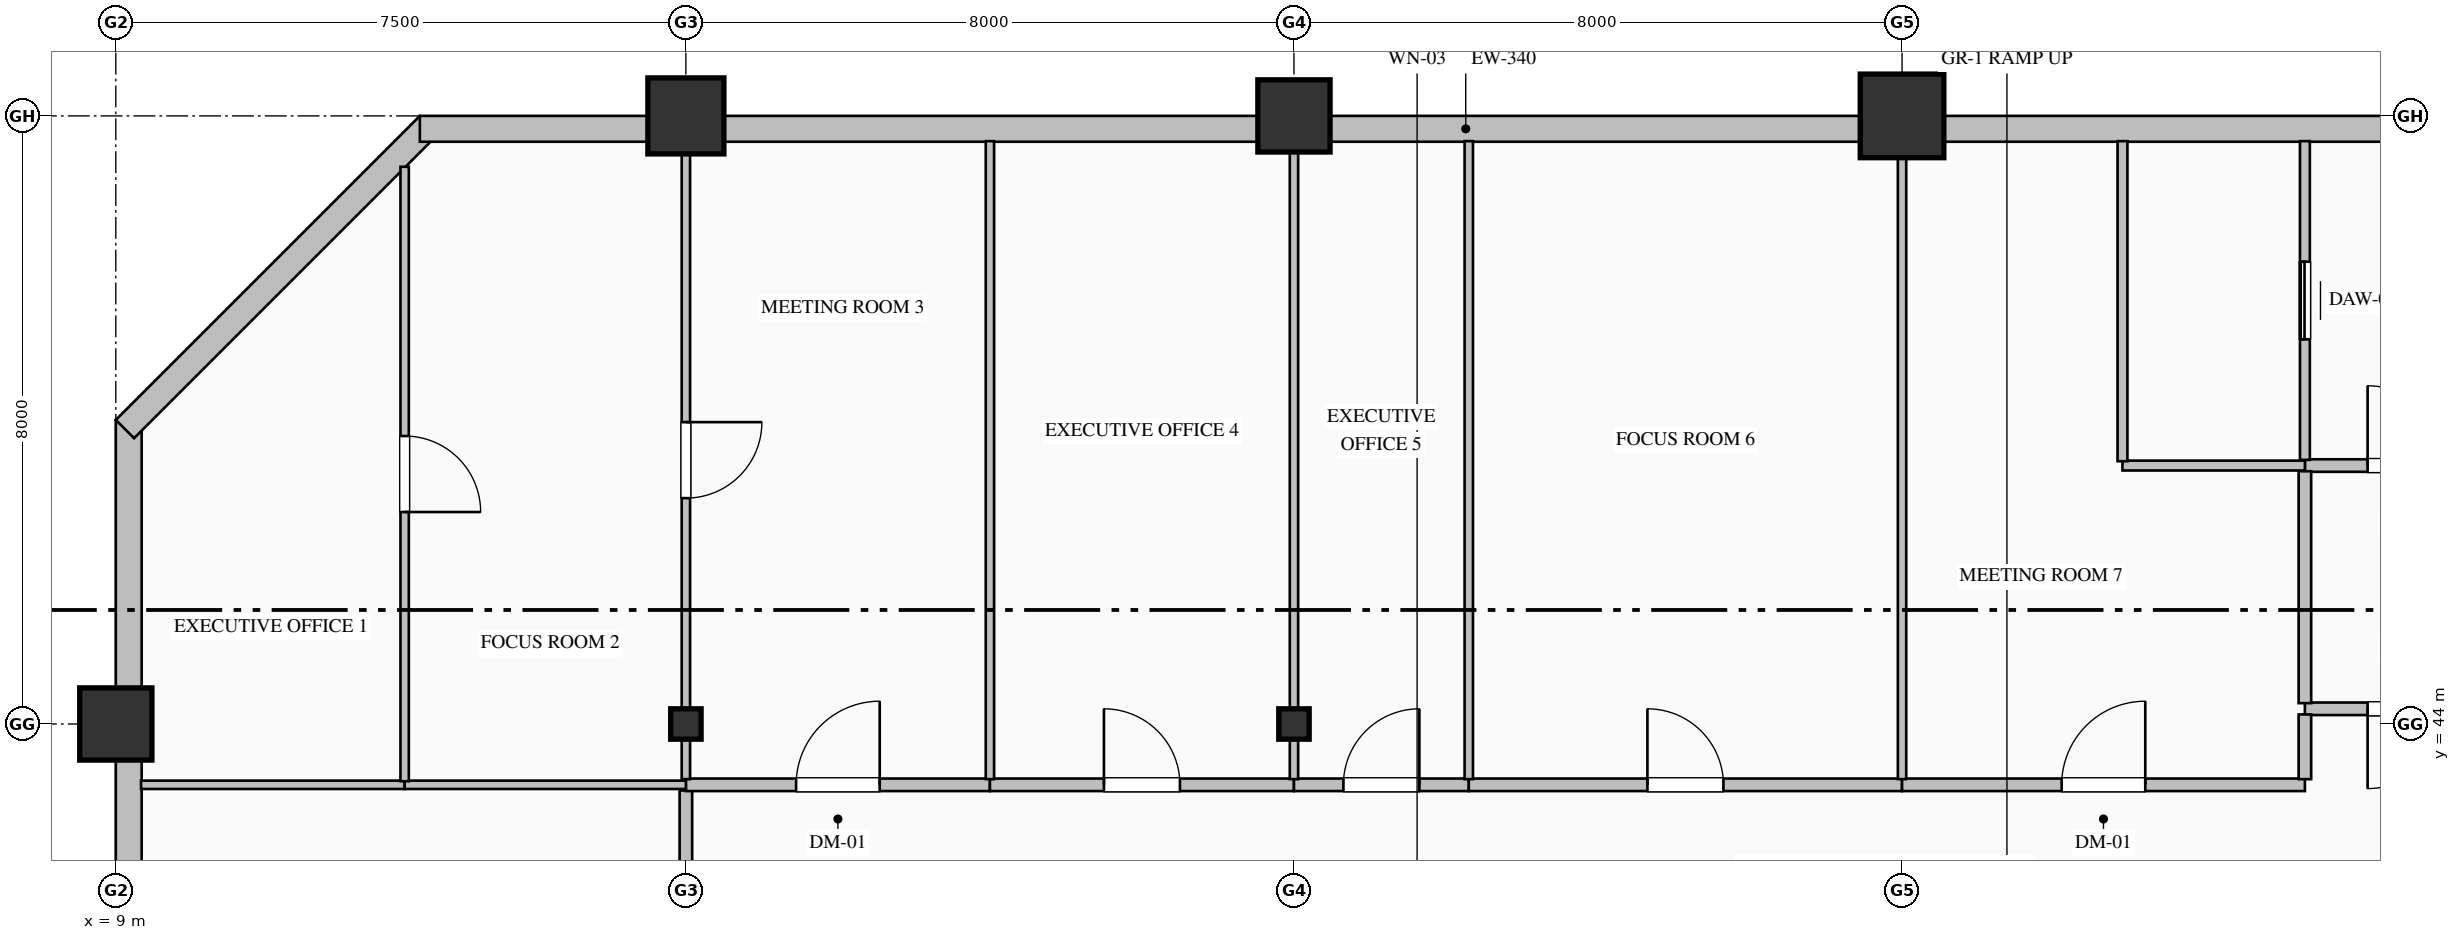
"""IFC4 building model, lengths in metres.
Left out: names, types, materials, properties, quantities, classifications, styles, units other than length and angle.
Written with IfcOpenShell. Run it as: python <this file> out.ifc"""

import sys

from ifc_helpers import new_model, si_unit, direction, frame, frame_2d, origin, origin_2d, place, context, subcontext, project, spatial, rectangle, hollow_rectangle, hollow_circle, i_section, extrude, element, fill, save


model = new_model("IFC4")
c1 = context("Model", 3, precision=1e-05, world=origin(), true_north=direction((0.0, 1.0)))
c2 = subcontext(c1, "Body", "Model", "MODEL_VIEW")
j1 = project(units=[si_unit("LENGTHUNIT", "METRE"), si_unit("PLANEANGLEUNIT", "RADIAN")], contexts=[c1])
p1 = place(None, origin())
s1 = spatial("IfcSite", under=j1, at=p1, CompositionType="ELEMENT")
p2 = place(p1, origin())
s2 = spatial("IfcBuilding", under=s1, at=p2, CompositionType="ELEMENT")
p3 = place(p2, frame((0.0, 0.0, 123.0)))
s3 = spatial("IfcBuildingStorey", under=s2, at=p3, CompositionType="ELEMENT", Elevation=123.0)
p4 = place(p3, frame((9.0, 44.0, 0.0), z_axis=(0.0, 0.0, 1.0), x_axis=(1.0, 0.0, 0.0)))
e1 = element("IfcColumn", 1, at=p4, inside=s3, PredefinedType="COLUMN", context=c2, shape_type="SweptSolid", body=[
    extrude(hollow_rectangle(XDim=0.95, YDim=0.95, WallThickness=0.036, at=origin_2d()), origin(), (0.0, 0.0, 1.0), 4.0),
])
p5 = place(p3, frame((16.5, 44.0, 0.0), z_axis=(0.0, 0.0, 1.0), x_axis=(1.0, 0.0, 0.0)))
e2 = element("IfcColumn", 2, at=p5, inside=s3, PredefinedType="COLUMN", context=c2, shape_type="SweptSolid", body=[
    extrude(i_section(OverallWidth=0.4, OverallDepth=0.4, WebThickness=0.013, FlangeThickness=0.021, FilletRadius=0.022, at=origin_2d()), origin(), (0.0, 0.0, 1.0), 4.0),
])
p6 = place(p3, frame((16.5, 52.0, 0.0), z_axis=(0.0, 0.0, 1.0), x_axis=(1.0, 0.0, 0.0)))
e3 = element("IfcColumn", 3, at=p6, inside=s3, PredefinedType="COLUMN", context=c2, shape_type="SweptSolid", body=[
    extrude(hollow_circle(Radius=0.5, WallThickness=0.036, at=origin_2d()), origin(), (0.0, 0.0, 1.0), 4.0),
])
p7 = place(p3, frame((24.5, 44.0, 0.0), z_axis=(0.0, 0.0, 1.0), x_axis=(1.0, 0.0, 0.0)))
e4 = element("IfcColumn", 4, at=p7, inside=s3, PredefinedType="COLUMN", context=c2, shape_type="SweptSolid", body=[
    extrude(i_section(OverallWidth=0.4, OverallDepth=0.4, WebThickness=0.013, FlangeThickness=0.021, FilletRadius=0.022, at=origin_2d()), origin(), (0.0, 0.0, 1.0), 4.0),
])
p8 = place(p3, frame((24.5, 52.0, 0.0), z_axis=(0.0, 0.0, 1.0), x_axis=(1.0, 0.0, 0.0)))
e5 = element("IfcColumn", 5, at=p8, inside=s3, PredefinedType="COLUMN", context=c2, shape_type="SweptSolid", body=[
    extrude(hollow_rectangle(XDim=0.95, YDim=0.95, WallThickness=0.036, at=origin_2d()), origin(), (0.0, 0.0, 1.0), 4.0),
])
p9 = place(p3, frame((32.5, 52.0, 0.0), z_axis=(0.0, 0.0, 1.0), x_axis=(1.0, 0.0, 0.0)))
e6 = element("IfcColumn", 6, at=p9, inside=s3, PredefinedType="COLUMN", context=c2, shape_type="SweptSolid", body=[
    extrude(hollow_rectangle(XDim=1.1, YDim=1.1, WallThickness=0.04, at=origin_2d()), origin(), (0.0, 0.0, 1.0), 4.0),
])
p10 = place(p3, frame((9.17, 32.0, 0.0), z_axis=(0.0, 0.0, 1.0), x_axis=(0.0, 1.0, 0.0)))
e7 = element("IfcWall", 7, at=p10, inside=s3, PredefinedType="SOLIDWALL", context=c2, shape_type="SweptSolid", body=[
    extrude(rectangle(XDim=16.0, YDim=0.34, at=frame_2d((8.0, 0.0))), origin(), (0.0, 0.0, 1.0), 3.265),
])
p11 = place(p10, frame((6.45, 0.0, 0.85)))
e8 = element("IfcOpeningElement", 8, at=p11, cuts=e7, PredefinedType="OPENING", context=c2, shape_type="SweptSolid", body=[
    extrude(rectangle(XDim=1.5, YDim=1.95, at=frame_2d((0.75, 0.975))), frame((0.0, 0.18, 0.0), z_axis=(0.0, -1.0, 0.0), x_axis=(1.0, 0.0, 0.0)), (0.0, 0.0, 1.0), 0.36),
])
p12 = place(p3, frame((9.12, 47.88, 0.0), z_axis=(0.0, 0.0, 1.0), x_axis=(0.707106781187, 0.707106781187, 0.0)))
e9 = element("IfcWall", 9, at=p12, inside=s3, PredefinedType="SOLIDWALL", context=c2, shape_type="SweptSolid", body=[
    extrude(rectangle(XDim=5.657, YDim=0.34, at=frame_2d((2.828, 0.0))), origin(), (0.0, 0.0, 1.0), 3.765),
])
p13 = place(p3, frame((13.0, 51.83, 0.0), z_axis=(0.0, 0.0, 1.0), x_axis=(1.0, 0.0, 0.0)))
e10 = element("IfcWall", 10, at=p13, inside=s3, PredefinedType="SOLIDWALL", context=c2, shape_type="SweptSolid", body=[
    extrude(rectangle(XDim=27.52, YDim=0.34, at=frame_2d((13.76, 0.0))), origin(), (0.0, 0.0, 1.0), 3.265),
])
p14 = place(p3, frame((37.8, 47.4, 0.0), z_axis=(0.0, 0.0, 1.0), x_axis=(1.0, 0.0, 0.0)))
e11 = element("IfcWall", 11, at=p14, inside=s3, PredefinedType="PARTITIONING", context=c2, shape_type="SweptSolid", body=[
    extrude(rectangle(XDim=2.7, YDim=0.165, at=frame_2d((1.35, 0.0))), origin(), (0.0, 0.0, 1.0), 3.765),
])
p15 = place(p14, frame((0.825, 0.0, 0.0)))
e12 = element("IfcOpeningElement", 12, at=p15, cuts=e11, PredefinedType="OPENING", context=c2, shape_type="SweptSolid", body=[
    extrude(rectangle(XDim=1.05, YDim=2.15, at=frame_2d((0.525, 1.075))), frame((0.0, 0.093, 0.0), z_axis=(0.0, -1.0, 0.0), x_axis=(1.0, 0.0, 0.0)), (0.0, 0.0, 1.0), 0.185),
])
p16 = place(p3, frame((40.5, 44.2, 0.0), z_axis=(0.0, 0.0, 1.0), x_axis=(-1.0, 0.0, 0.0)))
e13 = element("IfcWall", 13, at=p16, inside=s3, PredefinedType="PARTITIONING", context=c2, shape_type="SweptSolid", body=[
    extrude(rectangle(XDim=2.7, YDim=0.165, at=frame_2d((1.35, 0.0))), origin(), (0.0, 0.0, 1.0), 3.765),
])
p17 = place(p16, frame((0.825, 0.0, 0.0)))
e14 = element("IfcOpeningElement", 14, at=p17, cuts=e13, PredefinedType="OPENING", context=c2, shape_type="SweptSolid", body=[
    extrude(rectangle(XDim=1.05, YDim=2.15, at=frame_2d((0.525, 1.075))), frame((0.0, 0.093, 0.0), z_axis=(0.0, -1.0, 0.0), x_axis=(1.0, 0.0, 0.0)), (0.0, 0.0, 1.0), 0.185),
])
p18 = place(p3, frame((37.8, 44.274, 0.0), z_axis=(0.0, 0.0, 1.0), x_axis=(0.0, 1.0, 0.0)))
e15 = element("IfcWall", 15, at=p18, inside=s3, PredefinedType="PARTITIONING", context=c2, shape_type="SweptSolid", body=[
    extrude(rectangle(XDim=3.051, YDim=0.165, at=frame_2d((1.525, 0.0))), origin(), (0.0, 0.0, 1.0), 3.765),
])
p19 = place(p3, frame((37.8, 47.475, 0.0), z_axis=(0.0, 0.0, 1.0), x_axis=(0.0, 1.0, 0.0)))
e16 = element("IfcWall", 16, at=p19, inside=s3, PredefinedType="PARTITIONING", context=c2, shape_type="SweptSolid", body=[
    extrude(rectangle(XDim=4.193, YDim=0.13, at=frame_2d((2.097, 0.0))), origin(), (0.0, 0.0, 1.0), 3.765),
])
p20 = place(p19, frame((1.587, 0.0, 0.0)))
e17 = element("IfcOpeningElement", 17, at=p20, cuts=e16, PredefinedType="OPENING", context=c2, shape_type="SweptSolid", body=[
    extrude(rectangle(XDim=1.02, YDim=2.15, at=frame_2d((0.51, 1.075))), frame((0.0, 0.075, 0.0), z_axis=(0.0, -1.0, 0.0), x_axis=(1.0, 0.0, 0.0)), (0.0, 0.0, 1.0), 0.15),
])
p21 = place(p3, frame((37.8, 47.4, 0.0), z_axis=(0.0, 0.0, 1.0), x_axis=(-1.0, 0.0, 0.0)))
e18 = element("IfcWall", 18, at=p21, inside=s3, PredefinedType="PARTITIONING", context=c2, shape_type="SweptSolid", body=[
    extrude(rectangle(XDim=2.4, YDim=0.13, at=frame_2d((1.2, 0.0))), origin(), (0.0, 0.0, 1.0), 3.765),
])
p22 = place(p3, frame((35.4, 47.457, 0.0), z_axis=(0.0, 0.0, 1.0), x_axis=(0.0, 1.0, 0.0)))
e19 = element("IfcWall", 19, at=p22, inside=s3, PredefinedType="PARTITIONING", context=c2, shape_type="SweptSolid", body=[
    extrude(rectangle(XDim=4.211, YDim=0.13, at=frame_2d((2.105, 0.0))), origin(), (0.0, 0.0, 1.0), 3.765),
])
p23 = place(p3, frame((16.5, 41.0, 0.0), z_axis=(0.0, 0.0, 1.0), x_axis=(0.0, 1.0, 0.0)))
e20 = element("IfcWall", 20, at=p23, inside=s3, PredefinedType="PARTITIONING", context=c2, shape_type="SweptSolid", body=[
    extrude(rectangle(XDim=2.125, YDim=0.165, at=frame_2d((1.063, 0.0))), origin(), (0.0, 0.0, 1.0), 3.157),
])
p24 = place(p3, frame((16.5, 43.2, 0.0), z_axis=(0.0, 0.0, 1.0), x_axis=(1.0, 0.0, 0.0)))
e21 = element("IfcWall", 21, at=p24, inside=s3, PredefinedType="PARTITIONING", context=c2, shape_type="SweptSolid", body=[
    extrude(rectangle(XDim=4.0, YDim=0.165, at=frame_2d((2.0, 0.0))), origin(), (0.0, 0.0, 1.0), 3.765),
])
p25 = place(p24, frame((1.45, 0.0, 0.0)))
e22 = element("IfcOpeningElement", 22, at=p25, cuts=e21, PredefinedType="OPENING", context=c2, shape_type="SweptSolid", body=[
    extrude(rectangle(XDim=1.1, YDim=2.2, at=frame_2d((0.55, 1.1))), frame((0.0, 0.093, 0.0), z_axis=(0.0, -1.0, 0.0), x_axis=(1.0, 0.0, 0.0)), (0.0, 0.0, 1.0), 0.185),
])
p26 = place(p3, frame((20.5, 43.2, 0.0), z_axis=(0.0, 0.0, 1.0), x_axis=(1.0, 0.0, 0.0)))
e23 = element("IfcWall", 23, at=p26, inside=s3, PredefinedType="PARTITIONING", context=c2, shape_type="SweptSolid", body=[
    extrude(rectangle(XDim=4.0, YDim=0.165, at=frame_2d((2.0, 0.0))), origin(), (0.0, 0.0, 1.0), 3.765),
])
p27 = place(p26, frame((1.5, 0.0, 0.0)))
e24 = element("IfcOpeningElement", 24, at=p27, cuts=e23, PredefinedType="OPENING", context=c2, shape_type="SweptSolid", body=[
    extrude(rectangle(XDim=1.0, YDim=2.15, at=frame_2d((0.5, 1.075))), frame((0.0, 0.093, 0.0), z_axis=(0.0, -1.0, 0.0), x_axis=(1.0, 0.0, 0.0)), (0.0, 0.0, 1.0), 0.185),
])
p28 = place(p3, frame((24.5, 43.2, 0.0), z_axis=(0.0, 0.0, 1.0), x_axis=(1.0, 0.0, 0.0)))
e25 = element("IfcWall", 25, at=p28, inside=s3, PredefinedType="PARTITIONING", context=c2, shape_type="SweptSolid", body=[
    extrude(rectangle(XDim=2.3, YDim=0.165, at=frame_2d((1.15, 0.0))), origin(), (0.0, 0.0, 1.0), 3.765),
])
p29 = place(p28, frame((0.65, 0.0, 0.0)))
e26 = element("IfcOpeningElement", 26, at=p29, cuts=e25, PredefinedType="OPENING", context=c2, shape_type="SweptSolid", body=[
    extrude(rectangle(XDim=1.0, YDim=2.15, at=frame_2d((0.5, 1.075))), frame((0.0, 0.093, 0.0), z_axis=(0.0, -1.0, 0.0), x_axis=(1.0, 0.0, 0.0)), (0.0, 0.0, 1.0), 0.185),
])
p30 = place(p3, frame((26.8, 43.2, 0.0), z_axis=(0.0, 0.0, 1.0), x_axis=(1.0, 0.0, 0.0)))
e27 = element("IfcWall", 27, at=p30, inside=s3, PredefinedType="PARTITIONING", context=c2, shape_type="SweptSolid", body=[
    extrude(rectangle(XDim=5.7, YDim=0.165, at=frame_2d((2.85, 0.0))), origin(), (0.0, 0.0, 1.0), 3.765),
])
p31 = place(p30, frame((2.35, 0.0, 0.0)))
e28 = element("IfcOpeningElement", 28, at=p31, cuts=e27, PredefinedType="OPENING", context=c2, shape_type="SweptSolid", body=[
    extrude(rectangle(XDim=1.0, YDim=2.15, at=frame_2d((0.5, 1.075))), frame((0.0, 0.093, 0.0), z_axis=(0.0, -1.0, 0.0), x_axis=(1.0, 0.0, 0.0)), (0.0, 0.0, 1.0), 0.185),
])
p32 = place(p3, frame((32.5, 43.2, 0.0), z_axis=(0.0, 0.0, 1.0), x_axis=(1.0, 0.0, 0.0)))
e29 = element("IfcWall", 29, at=p32, inside=s3, PredefinedType="PARTITIONING", context=c2, shape_type="SweptSolid", body=[
    extrude(rectangle(XDim=5.3, YDim=0.165, at=frame_2d((2.65, 0.0))), origin(), (0.0, 0.0, 1.0), 3.765),
])
p33 = place(p32, frame((2.1, 0.0, 0.0)))
e30 = element("IfcOpeningElement", 30, at=p33, cuts=e29, PredefinedType="OPENING", context=c2, shape_type="SweptSolid", body=[
    extrude(rectangle(XDim=1.1, YDim=2.2, at=frame_2d((0.55, 1.1))), frame((0.0, 0.093, 0.0), z_axis=(0.0, -1.0, 0.0), x_axis=(1.0, 0.0, 0.0)), (0.0, 0.0, 1.0), 0.185),
])
p34 = place(p3, frame((37.8, 43.274, 0.0), z_axis=(0.0, 0.0, 1.0), x_axis=(0.0, 1.0, 0.0)))
e31 = element("IfcWall", 31, at=p34, inside=s3, PredefinedType="PARTITIONING", context=c2, shape_type="SweptSolid", body=[
    extrude(rectangle(XDim=0.851, YDim=0.165, at=frame_2d((0.426, 0.0))), origin(), (0.0, 0.0, 1.0), 3.765),
])
p35 = place(p3, frame((9.332, 43.2, 0.0), z_axis=(0.0, 0.0, 1.0), x_axis=(1.0, 0.0, 0.0)))
e32 = element("IfcWall", 32, at=p35, inside=s3, PredefinedType="MOVABLE", context=c2, shape_type="SweptSolid", body=[
    extrude(rectangle(XDim=3.468, YDim=0.11, at=frame_2d((1.734, 0.0))), origin(), (0.0, 0.0, 1.0), 3.765),
])
p36 = place(p3, frame((12.8, 43.2, 0.0), z_axis=(0.0, 0.0, 1.0), x_axis=(1.0, 0.0, 0.0)))
e33 = element("IfcWall", 33, at=p36, inside=s3, PredefinedType="MOVABLE", context=c2, shape_type="SweptSolid", body=[
    extrude(rectangle(XDim=3.7, YDim=0.11, at=frame_2d((1.85, 0.0))), origin(), (0.0, 0.0, 1.0), 3.765),
])
p37 = place(p3, frame((12.8, 51.331, 0.0), z_axis=(0.0, 0.0, 1.0), x_axis=(0.0, -1.0, 0.0)))
e34 = element("IfcWall", 34, at=p37, inside=s3, PredefinedType="MOVABLE", context=c2, shape_type="SweptSolid", body=[
    extrude(rectangle(XDim=8.083, YDim=0.11, at=frame_2d((4.042, 0.0))), origin(), (0.0, 0.0, 1.0), 3.765),
])
p38 = place(p37, frame((3.542, 0.0, 0.0)))
e35 = element("IfcOpeningElement", 35, at=p38, cuts=e34, PredefinedType="OPENING", context=c2, shape_type="SweptSolid", body=[
    extrude(rectangle(XDim=1.0, YDim=2.15, at=frame_2d((0.5, 1.075))), frame((0.0, 0.065, 0.0), z_axis=(0.0, -1.0, 0.0), x_axis=(1.0, 0.0, 0.0)), (0.0, 0.0, 1.0), 0.13),
])
p39 = place(p3, frame((16.5, 51.668, 0.0), z_axis=(0.0, 0.0, 1.0), x_axis=(0.0, -1.0, 0.0)))
e36 = element("IfcWall", 36, at=p39, inside=s3, PredefinedType="MOVABLE", context=c2, shape_type="SweptSolid", body=[
    extrude(rectangle(XDim=8.394, YDim=0.11, at=frame_2d((4.197, 0.0))), origin(), (0.0, 0.0, 1.0), 3.157),
])
p40 = place(p39, frame((3.697, 0.0, 0.0)))
e37 = element("IfcOpeningElement", 37, at=p40, cuts=e36, PredefinedType="OPENING", context=c2, shape_type="SweptSolid", body=[
    extrude(rectangle(XDim=1.0, YDim=2.15, at=frame_2d((0.5, 1.075))), frame((0.0, 0.065, 0.0), z_axis=(0.0, -1.0, 0.0), x_axis=(1.0, 0.0, 0.0)), (0.0, 0.0, 1.0), 0.13),
])
p41 = place(p3, frame((20.5, 51.668, 0.0), z_axis=(0.0, 0.0, 1.0), x_axis=(0.0, -1.0, 0.0)))
e38 = element("IfcWall", 38, at=p41, inside=s3, PredefinedType="MOVABLE", context=c2, shape_type="SweptSolid", body=[
    extrude(rectangle(XDim=8.394, YDim=0.11, at=frame_2d((4.197, 0.0))), origin(), (0.0, 0.0, 1.0), 3.765),
])
p42 = place(p3, frame((24.5, 51.668, 0.0), z_axis=(0.0, 0.0, 1.0), x_axis=(0.0, -1.0, 0.0)))
e39 = element("IfcWall", 39, at=p42, inside=s3, PredefinedType="MOVABLE", context=c2, shape_type="SweptSolid", body=[
    extrude(rectangle(XDim=8.394, YDim=0.11, at=frame_2d((4.197, 0.0))), origin(), (0.0, 0.0, 1.0), 3.157),
])
for number, where, z_axis, x_axis in (
    (40, (26.8, 51.668, 0.0), (0.0, 0.0, 1.0), (0.0, -1.0, 0.0)),
    (41, (32.5, 51.668, 0.0), (0.0, 0.0, 1.0), (0.0, -1.0, 0.0)),
):
    element("IfcWall", number, at=place(p3, frame(where, z_axis=z_axis, x_axis=x_axis)), inside=s3, PredefinedType="MOVABLE", context=c2, shape_type="SweptSolid", body=[
        extrude(rectangle(XDim=8.394, YDim=0.11, at=frame_2d((4.197, 0.0))), origin(), (0.0, 0.0, 1.0), 3.765),
    ])
p43 = place(p15, origin())
e42 = element("IfcDoor", 42, at=p43, inside=s3, OperationType="SINGLE_SWING_LEFT", PredefinedType="DOOR", context=c2, shape_type="SweptSolid", body=[
    extrude(rectangle(XDim=1.05, YDim=2.15, at=frame_2d((0.525, 1.075))), frame((0.0, 0.025, 0.0), z_axis=(0.0, -1.0, 0.0), x_axis=(1.0, 0.0, 0.0)), (0.0, 0.0, 1.0), 0.05),
])
fill(e12, e42)
p44 = place(p17, origin())
e43 = element("IfcDoor", 43, at=p44, inside=s3, OperationType="SINGLE_SWING_RIGHT", PredefinedType="DOOR", context=c2, shape_type="SweptSolid", body=[
    extrude(rectangle(XDim=1.05, YDim=2.15, at=frame_2d((0.525, 1.075))), frame((0.0, 0.025, 0.0), z_axis=(0.0, -1.0, 0.0), x_axis=(1.0, 0.0, 0.0)), (0.0, 0.0, 1.0), 0.05),
])
fill(e14, e43)
p45 = place(p20, origin())
e44 = element("IfcDoor", 44, at=p45, inside=s3, OperationType="SLIDING_TO_LEFT", PredefinedType="DOOR", context=c2, shape_type="SweptSolid", body=[
    extrude(rectangle(XDim=1.02, YDim=2.15, at=frame_2d((0.51, 1.075))), frame((0.0, 0.025, 0.0), z_axis=(0.0, -1.0, 0.0), x_axis=(1.0, 0.0, 0.0)), (0.0, 0.0, 1.0), 0.05),
])
fill(e17, e44)
p46 = place(p38, origin())
e45 = element("IfcDoor", 45, at=p46, inside=s3, OperationType="SINGLE_SWING_RIGHT", PredefinedType="DOOR", context=c2, shape_type="SweptSolid", body=[
    extrude(rectangle(XDim=1.0, YDim=2.15, at=frame_2d((0.5, 1.075))), frame((0.0, 0.025, 0.0), z_axis=(0.0, -1.0, 0.0), x_axis=(1.0, 0.0, 0.0)), (0.0, 0.0, 1.0), 0.05),
])
fill(e35, e45)
p47 = place(p40, origin())
e46 = element("IfcDoor", 46, at=p47, inside=s3, OperationType="SINGLE_SWING_LEFT", PredefinedType="DOOR", context=c2, shape_type="SweptSolid", body=[
    extrude(rectangle(XDim=1.0, YDim=2.15, at=frame_2d((0.5, 1.075))), frame((0.0, 0.025, 0.0), z_axis=(0.0, -1.0, 0.0), x_axis=(1.0, 0.0, 0.0)), (0.0, 0.0, 1.0), 0.05),
])
fill(e37, e46)
p48 = place(p25, origin())
e47 = element("IfcDoor", 47, at=p48, inside=s3, OperationType="SINGLE_SWING_RIGHT", PredefinedType="DOOR", context=c2, shape_type="SweptSolid", body=[
    extrude(rectangle(XDim=1.1, YDim=2.2, at=frame_2d((0.55, 1.1))), frame((0.0, 0.025, 0.0), z_axis=(0.0, -1.0, 0.0), x_axis=(1.0, 0.0, 0.0)), (0.0, 0.0, 1.0), 0.05),
])
fill(e22, e47)
p49 = place(p27, origin())
e48 = element("IfcDoor", 48, at=p49, inside=s3, OperationType="SINGLE_SWING_LEFT", PredefinedType="DOOR", context=c2, shape_type="SweptSolid", body=[
    extrude(rectangle(XDim=1.0, YDim=2.15, at=frame_2d((0.5, 1.075))), frame((0.0, 0.025, 0.0), z_axis=(0.0, -1.0, 0.0), x_axis=(1.0, 0.0, 0.0)), (0.0, 0.0, 1.0), 0.05),
])
fill(e24, e48)
p50 = place(p29, origin())
e49 = element("IfcDoor", 49, at=p50, inside=s3, OperationType="SINGLE_SWING_RIGHT", PredefinedType="DOOR", context=c2, shape_type="SweptSolid", body=[
    extrude(rectangle(XDim=1.0, YDim=2.15, at=frame_2d((0.5, 1.075))), frame((0.0, 0.025, 0.0), z_axis=(0.0, -1.0, 0.0), x_axis=(1.0, 0.0, 0.0)), (0.0, 0.0, 1.0), 0.05),
])
fill(e26, e49)
p51 = place(p31, origin())
e50 = element("IfcDoor", 50, at=p51, inside=s3, OperationType="SINGLE_SWING_LEFT", PredefinedType="DOOR", context=c2, shape_type="SweptSolid", body=[
    extrude(rectangle(XDim=1.0, YDim=2.15, at=frame_2d((0.5, 1.075))), frame((0.0, 0.025, 0.0), z_axis=(0.0, -1.0, 0.0), x_axis=(1.0, 0.0, 0.0)), (0.0, 0.0, 1.0), 0.05),
])
fill(e28, e50)
p52 = place(p33, origin())
e51 = element("IfcDoor", 51, at=p52, inside=s3, OperationType="SINGLE_SWING_RIGHT", PredefinedType="DOOR", context=c2, shape_type="SweptSolid", body=[
    extrude(rectangle(XDim=1.1, YDim=2.2, at=frame_2d((0.55, 1.1))), frame((0.0, 0.025, 0.0), z_axis=(0.0, -1.0, 0.0), x_axis=(1.0, 0.0, 0.0)), (0.0, 0.0, 1.0), 0.05),
])
fill(e30, e51)
save(model, sys.argv[1])
